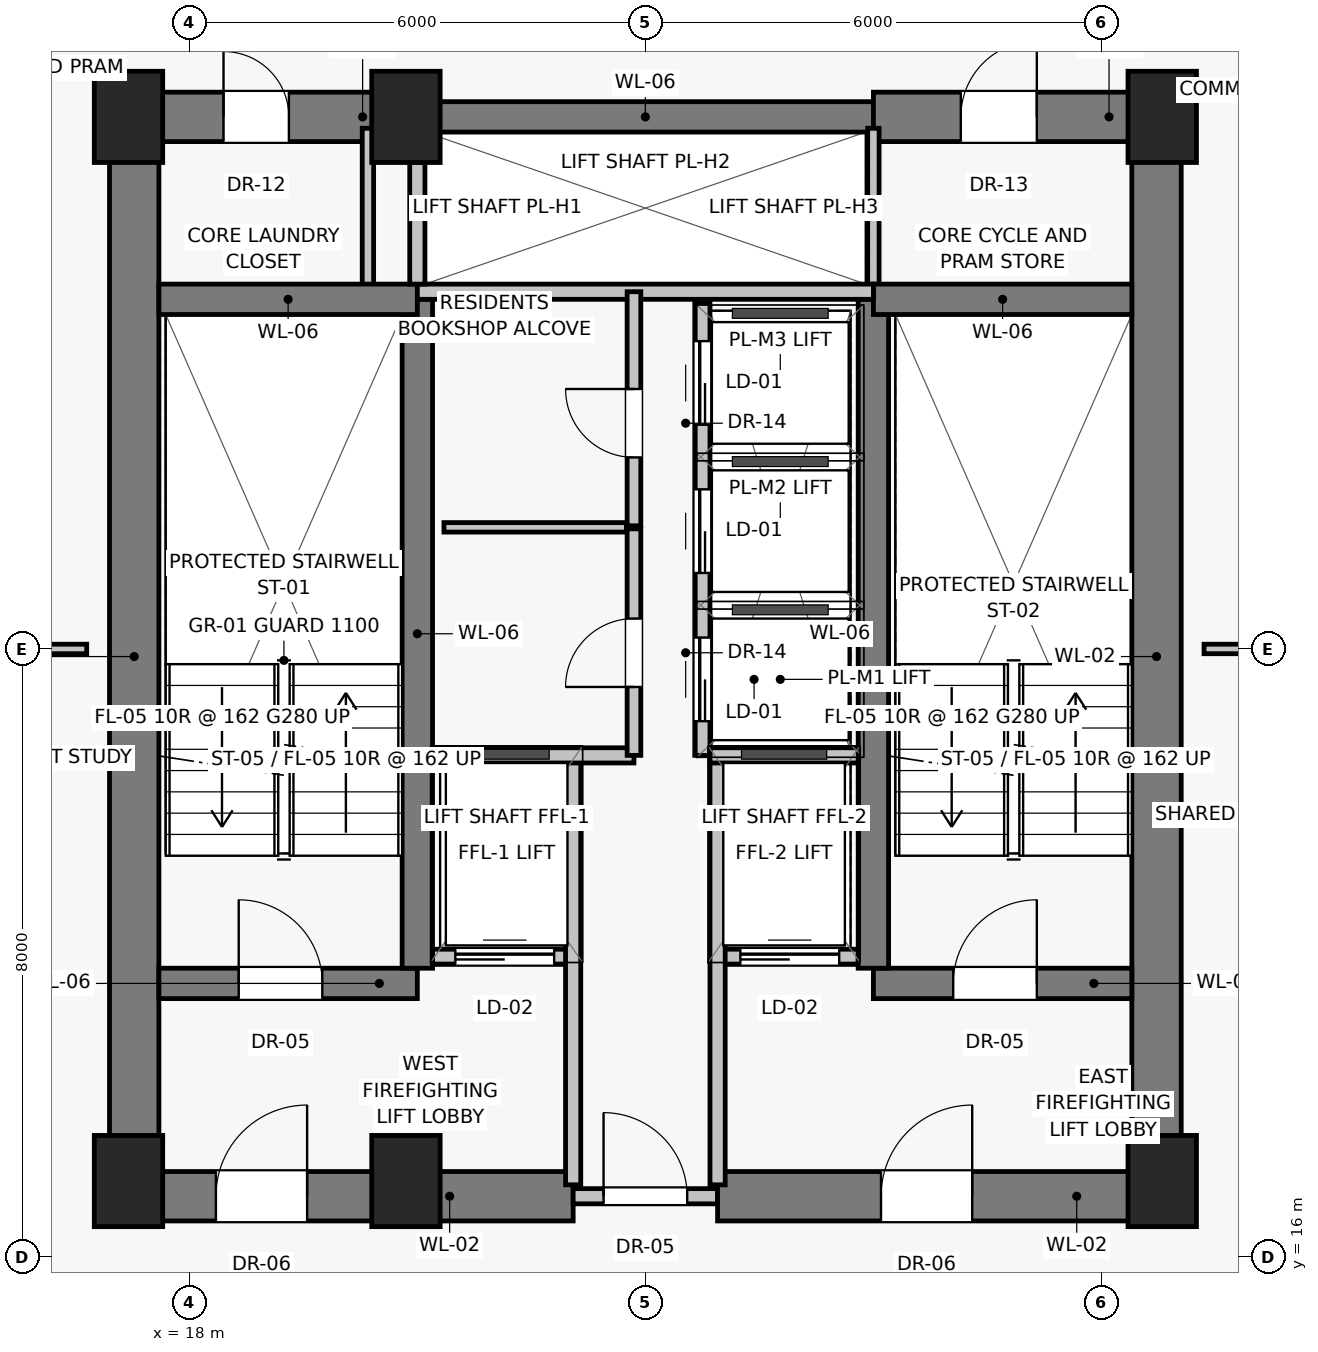
"""IFC4 building model, lengths in metres.
Left out: names, types, materials, properties, quantities, classifications, styles, units other than length and angle.
Written with IfcOpenShell. Run it as: python <this file> out.ifc"""

import sys

from ifc_helpers import new_model, si_unit, direction, frame, frame_2d, origin, origin_2d, place, context, subcontext, project, spatial, rectangle, extrude, source, transform, mapped, element, fill, save


model = new_model("IFC4")
c1 = context("Model", 3, precision=1e-05, world=origin(), true_north=direction((0.0, 1.0)))
c2 = subcontext(c1, "Body", "Model", "MODEL_VIEW")
j1 = project(units=[si_unit("LENGTHUNIT", "METRE"), si_unit("PLANEANGLEUNIT", "RADIAN")], contexts=[c1])
p1 = place(None, origin())
s1 = spatial("IfcSite", under=j1, at=p1, CompositionType="ELEMENT")
p2 = place(p1, origin())
s2 = spatial("IfcBuilding", under=s1, at=p2, CompositionType="ELEMENT")
p3 = place(p2, frame((0.0, 0.0, 129.5)))
s3 = spatial("IfcBuildingStorey", under=s2, at=p3, CompositionType="ELEMENT", Elevation=129.5)
for number, where, z_axis, x_axis in (
    (1, (17.2, 17.0, 0.0), (0.0, 0.0, 1.0), (1.0, 0.0, 0.0)),
    (2, (20.85, 17.0, 0.0), (0.0, 0.0, 1.0), (1.0, 0.0, 0.0)),
    (3, (30.8, 17.0, 0.0), (0.0, 0.0, 1.0), (1.0, 0.0, 0.0)),
    (4, (17.2, 31.0, 0.0), (0.0, 0.0, 1.0), (1.0, 0.0, 0.0)),
    (5, (20.85, 31.0, 0.0), (0.0, 0.0, 1.0), (1.0, 0.0, 0.0)),
    (6, (30.8, 31.0, 0.0), (0.0, 0.0, 1.0), (1.0, 0.0, 0.0)),
):
    element("IfcColumn", number, at=place(p3, frame(where, z_axis=z_axis, x_axis=x_axis)), inside=s3, PredefinedType="PILASTER", context=c2, shape_type="SweptSolid", body=[
        extrude(rectangle(XDim=0.9, YDim=1.2, at=origin_2d()), origin(), (0.0, 0.0, 1.0), 3.25),
    ])
for number, where, z_axis, x_axis in (
    (7, (17.275, 16.8, 0.0), (0.0, 0.0, 1.0), (0.0, 1.0, 0.0)),
    (8, (30.725, 16.8, 0.0), (0.0, 0.0, 1.0), (0.0, 1.0, 0.0)),
):
    element("IfcWall", number, at=place(p3, frame(where, z_axis=z_axis, x_axis=x_axis)), inside=s3, PredefinedType="SHEAR", context=c2, shape_type="SweptSolid", body=[
        extrude(rectangle(XDim=14.2, YDim=0.65, at=frame_2d((7.1, 0.0))), origin(), (0.0, 0.0, 1.0), 3.0),
    ])
p4 = place(p3, frame((17.2, 16.8, 0.0), z_axis=(0.0, 0.0, 1.0), x_axis=(1.0, 0.0, 0.0)))
e9 = element("IfcWall", 9, at=p4, inside=s3, PredefinedType="SHEAR", context=c2, shape_type="SweptSolid", body=[
    extrude(rectangle(XDim=5.85, YDim=0.65, at=frame_2d((2.925, 0.0))), origin(), (0.0, 0.0, 1.0), 3.0),
])
p5 = place(p4, frame((1.15, 0.0, 0.0)))
e10 = element("IfcOpeningElement", 10, at=p5, cuts=e9, PredefinedType="OPENING", context=c2, shape_type="SweptSolid", body=[
    extrude(rectangle(XDim=1.2, YDim=2.03, at=frame_2d((0.6, 1.015))), frame((0.0, 0.335, 0.0), z_axis=(0.0, -1.0, 0.0), x_axis=(1.0, 0.0, 0.0)), (0.0, 0.0, 1.0), 0.67),
])
p6 = place(p3, frame((23.05, 16.8, 0.0), z_axis=(0.0, 0.0, 1.0), x_axis=(1.0, 0.0, 0.0)))
e11 = element("IfcWall", 11, at=p6, inside=s3, PredefinedType="SOLIDWALL", context=c2, shape_type="SweptSolid", body=[
    extrude(rectangle(XDim=1.9, YDim=0.2, at=frame_2d((0.95, 0.0))), origin(), (0.0, 0.0, 1.0), 2.15),
])
p7 = place(p6, frame((0.4, 0.0, 0.0)))
e12 = element("IfcOpeningElement", 12, at=p7, cuts=e11, PredefinedType="OPENING", context=c2, shape_type="SweptSolid", body=[
    extrude(rectangle(XDim=1.1, YDim=2.03, at=frame_2d((0.55, 1.015))), frame((0.0, 0.11, 0.0), z_axis=(0.0, -1.0, 0.0), x_axis=(1.0, 0.0, 0.0)), (0.0, 0.0, 1.0), 0.22),
])
p8 = place(p3, frame((24.95, 16.8, 0.0), z_axis=(0.0, 0.0, 1.0), x_axis=(1.0, 0.0, 0.0)))
e13 = element("IfcWall", 13, at=p8, inside=s3, PredefinedType="SHEAR", context=c2, shape_type="SweptSolid", body=[
    extrude(rectangle(XDim=5.85, YDim=0.65, at=frame_2d((2.925, 0.0))), origin(), (0.0, 0.0, 1.0), 3.0),
])
p9 = place(p8, frame((2.15, 0.0, 0.0)))
e14 = element("IfcOpeningElement", 14, at=p9, cuts=e13, PredefinedType="OPENING", context=c2, shape_type="SweptSolid", body=[
    extrude(rectangle(XDim=1.2, YDim=2.03, at=frame_2d((0.6, 1.015))), frame((0.0, 0.335, 0.0), z_axis=(0.0, -1.0, 0.0), x_axis=(1.0, 0.0, 0.0)), (0.0, 0.0, 1.0), 0.67),
])
p10 = place(p3, frame((17.2, 31.0, 0.0), z_axis=(0.0, 0.0, 1.0), x_axis=(1.0, 0.0, 0.0)))
e15 = element("IfcWall", 15, at=p10, inside=s3, PredefinedType="SHEAR", context=c2, shape_type="SweptSolid", body=[
    extrude(rectangle(XDim=3.8, YDim=0.65, at=frame_2d((1.9, 0.0))), origin(), (0.0, 0.0, 1.0), 3.0),
])
p11 = place(p10, frame((1.25, 0.0, 0.0)))
e16 = element("IfcOpeningElement", 16, at=p11, cuts=e15, PredefinedType="OPENING", context=c2, shape_type="SweptSolid", body=[
    extrude(rectangle(XDim=0.86, YDim=2.01, at=frame_2d((0.43, 1.005))), frame((0.0, 0.335, 0.0), z_axis=(0.0, -1.0, 0.0), x_axis=(1.0, 0.0, 0.0)), (0.0, 0.0, 1.0), 0.67),
])
p12 = place(p3, frame((21.0, 31.0, 0.0), z_axis=(0.0, 0.0, 1.0), x_axis=(1.0, 0.0, 0.0)))
e17 = element("IfcWall", 17, at=p12, inside=s3, PredefinedType="SHEAR", context=c2, shape_type="SweptSolid", body=[
    extrude(rectangle(XDim=6.0, YDim=0.4, at=frame_2d((3.0, 0.0))), origin(), (0.0, 0.0, 1.0), 3.0),
])
p13 = place(p3, frame((27.0, 31.0, 0.0), z_axis=(0.0, 0.0, 1.0), x_axis=(1.0, 0.0, 0.0)))
e18 = element("IfcWall", 18, at=p13, inside=s3, PredefinedType="SHEAR", context=c2, shape_type="SweptSolid", body=[
    extrude(rectangle(XDim=3.8, YDim=0.65, at=frame_2d((1.9, 0.0))), origin(), (0.0, 0.0, 1.0), 3.0),
])
p14 = place(p13, frame((1.15, 0.0, 0.0)))
e19 = element("IfcOpeningElement", 19, at=p14, cuts=e18, PredefinedType="OPENING", context=c2, shape_type="SweptSolid", body=[
    extrude(rectangle(XDim=1.0, YDim=2.01, at=frame_2d((0.5, 1.005))), frame((0.0, 0.335, 0.0), z_axis=(0.0, -1.0, 0.0), x_axis=(1.0, 0.0, 0.0)), (0.0, 0.0, 1.0), 0.67),
])
for number, where, z_axis, x_axis in (
    (20, (20.35, 28.65, 0.0), (0.0, 0.0, 1.0), (0.0, 1.0, 0.0)),
    (21, (27.0, 28.65, 0.0), (0.0, 0.0, 1.0), (0.0, 1.0, 0.0)),
):
    element("IfcWall", number, at=place(p3, frame(where, z_axis=z_axis, x_axis=x_axis)), inside=s3, PredefinedType="PARTITIONING", context=c2, shape_type="SweptSolid", body=[
        extrude(rectangle(XDim=2.2, YDim=0.15, at=frame_2d((1.1, 0.0))), origin(), (0.0, 0.0, 1.0), 3.0),
    ])
p15 = place(p3, frame((17.6, 19.6, 0.0), z_axis=(0.0, 0.0, 1.0), x_axis=(1.0, 0.0, 0.0)))
e22 = element("IfcWall", 22, at=p15, inside=s3, PredefinedType="SHEAR", context=c2, shape_type="SweptSolid", body=[
    extrude(rectangle(XDim=3.4, YDim=0.4, at=frame_2d((1.7, 0.0))), origin(), (0.0, 0.0, 1.0), 3.0),
])
p16 = place(p15, frame((1.05, 0.0, 0.0)))
e23 = element("IfcOpeningElement", 23, at=p16, cuts=e22, PredefinedType="OPENING", context=c2, shape_type="SweptSolid", body=[
    extrude(rectangle(XDim=1.1, YDim=2.03, at=frame_2d((0.55, 1.015))), frame((0.0, 0.21, 0.0), z_axis=(0.0, -1.0, 0.0), x_axis=(1.0, 0.0, 0.0)), (0.0, 0.0, 1.0), 0.42),
])
p17 = place(p3, frame((21.2, 19.95, 0.0), z_axis=(0.0, 0.0, 1.0), x_axis=(1.0, 0.0, 0.0)))
e24 = element("IfcWall", 24, at=p17, inside=s3, PredefinedType="SOLIDWALL", context=c2, shape_type="SweptSolid", body=[
    extrude(rectangle(XDim=1.85, YDim=0.2, at=frame_2d((0.925, 0.0))), origin(), (0.0, 0.0, 1.0), 3.0),
])
p18 = place(p17, frame((0.3, 0.0, 0.0)))
e25 = element("IfcOpeningElement", 25, at=p18, cuts=e24, PredefinedType="OPENING", context=c2, shape_type="SweptSolid", body=[
    extrude(rectangle(XDim=1.3, YDim=2.25, at=frame_2d((0.65, 1.125))), frame((0.0, 0.11, 0.0), z_axis=(0.0, -1.0, 0.0), x_axis=(1.0, 0.0, 0.0)), (0.0, 0.0, 1.0), 0.22),
])
p19 = place(p3, frame((24.95, 19.95, 0.0), z_axis=(0.0, 0.0, 1.0), x_axis=(1.0, 0.0, 0.0)))
e26 = element("IfcWall", 26, at=p19, inside=s3, PredefinedType="SOLIDWALL", context=c2, shape_type="SweptSolid", body=[
    extrude(rectangle(XDim=1.85, YDim=0.2, at=frame_2d((0.925, 0.0))), origin(), (0.0, 0.0, 1.0), 3.0),
])
p20 = place(p19, frame((0.3, 0.0, 0.0)))
e27 = element("IfcOpeningElement", 27, at=p20, cuts=e26, PredefinedType="OPENING", context=c2, shape_type="SweptSolid", body=[
    extrude(rectangle(XDim=1.3, YDim=2.25, at=frame_2d((0.65, 1.125))), frame((0.0, 0.11, 0.0), z_axis=(0.0, -1.0, 0.0), x_axis=(1.0, 0.0, 0.0)), (0.0, 0.0, 1.0), 0.22),
])
p21 = place(p3, frame((27.0, 19.6, 0.0), z_axis=(0.0, 0.0, 1.0), x_axis=(1.0, 0.0, 0.0)))
e28 = element("IfcWall", 28, at=p21, inside=s3, PredefinedType="SHEAR", context=c2, shape_type="SweptSolid", body=[
    extrude(rectangle(XDim=3.4, YDim=0.4, at=frame_2d((1.7, 0.0))), origin(), (0.0, 0.0, 1.0), 3.0),
])
p22 = place(p21, frame((1.05, 0.0, 0.0)))
e29 = element("IfcOpeningElement", 29, at=p22, cuts=e28, PredefinedType="OPENING", context=c2, shape_type="SweptSolid", body=[
    extrude(rectangle(XDim=1.1, YDim=2.03, at=frame_2d((0.55, 1.015))), frame((0.0, 0.21, 0.0), z_axis=(0.0, -1.0, 0.0), x_axis=(1.0, 0.0, 0.0)), (0.0, 0.0, 1.0), 0.42),
])
for number, where, z_axis, x_axis in (
    (30, (21.0, 19.8, 0.0), (0.0, 0.0, 1.0), (0.0, 1.0, 0.0)),
    (31, (27.0, 19.8, 0.0), (0.0, 0.0, 1.0), (0.0, 1.0, 0.0)),
):
    element("IfcWall", number, at=place(p3, frame(where, z_axis=z_axis, x_axis=x_axis)), inside=s3, PredefinedType="SHEAR", context=c2, shape_type="SweptSolid", body=[
        extrude(rectangle(XDim=8.8, YDim=0.4, at=frame_2d((4.4, 0.0))), origin(), (0.0, 0.0, 1.0), 3.0),
    ])
for number, where, z_axis, x_axis in (
    (32, (17.6, 28.6, 0.0), (0.0, 0.0, 1.0), (1.0, 0.0, 0.0)),
    (33, (27.0, 28.6, 0.0), (0.0, 0.0, 1.0), (1.0, 0.0, 0.0)),
):
    element("IfcWall", number, at=place(p3, frame(where, z_axis=z_axis, x_axis=x_axis)), inside=s3, PredefinedType="SHEAR", context=c2, shape_type="SweptSolid", body=[
        extrude(rectangle(XDim=3.4, YDim=0.4, at=frame_2d((1.7, 0.0))), origin(), (0.0, 0.0, 1.0), 3.0),
    ])
for number, where, z_axis, x_axis in (
    (34, (23.05, 16.95, 0.0), (0.0, 0.0, 1.0), (0.0, 1.0, 0.0)),
    (35, (24.95, 16.95, 0.0), (0.0, 0.0, 1.0), (0.0, 1.0, 0.0)),
):
    element("IfcWall", number, at=place(p3, frame(where, z_axis=z_axis, x_axis=x_axis)), inside=s3, PredefinedType="SOLIDWALL", context=c2, shape_type="SweptSolid", body=[
        extrude(rectangle(XDim=5.6, YDim=0.2, at=frame_2d((2.8, 0.0))), origin(), (0.0, 0.0, 1.0), 3.0),
    ])
p23 = place(p3, frame((21.2, 22.6, 0.0), z_axis=(0.0, 0.0, 1.0), x_axis=(1.0, 0.0, 0.0)))
e36 = element("IfcWall", 36, at=p23, inside=s3, PredefinedType="SOLIDWALL", context=c2, shape_type="SweptSolid", body=[
    extrude(rectangle(XDim=2.65, YDim=0.2, at=frame_2d((1.325, 0.0))), origin(), (0.0, 0.0, 1.0), 3.0),
])
p24 = place(p3, frame((24.85, 22.6, 0.0), z_axis=(0.0, 0.0, 1.0), x_axis=(1.0, 0.0, 0.0)))
e37 = element("IfcWall", 37, at=p24, inside=s3, PredefinedType="SOLIDWALL", context=c2, shape_type="SweptSolid", body=[
    extrude(rectangle(XDim=1.95, YDim=0.2, at=frame_2d((0.975, 0.0))), origin(), (0.0, 0.0, 1.0), 3.0),
])
p25 = place(p3, frame((21.0, 28.7, 0.0), z_axis=(0.0, 0.0, 1.0), x_axis=(1.0, 0.0, 0.0)))
e38 = element("IfcWall", 38, at=p25, inside=s3, PredefinedType="SOLIDWALL", context=c2, shape_type="SweptSolid", body=[
    extrude(rectangle(XDim=6.0, YDim=0.2, at=frame_2d((3.0, 0.0))), origin(), (0.0, 0.0, 1.0), 3.0),
])
p26 = place(p3, frame((21.0, 28.8, 0.0), z_axis=(0.0, 0.0, 1.0), x_axis=(0.0, 1.0, 0.0)))
e39 = element("IfcWall", 39, at=p26, inside=s3, PredefinedType="SOLIDWALL", context=c2, shape_type="SweptSolid", body=[
    extrude(rectangle(XDim=1.6, YDim=0.2, at=frame_2d((0.8, 0.0))), origin(), (0.0, 0.0, 1.0), 3.0),
])
p27 = place(p3, frame((23.85, 22.6, 0.0), z_axis=(0.0, 0.0, 1.0), x_axis=(0.0, 1.0, 0.0)))
e40 = element("IfcWall", 40, at=p27, inside=s3, PredefinedType="PARTITIONING", context=c2, shape_type="SweptSolid", body=[
    extrude(rectangle(XDim=2.98, YDim=0.18, at=frame_2d((1.49, 0.0))), origin(), (0.0, 0.0, 1.0), 3.0),
])
p28 = place(p27, frame((0.9, 0.0, 0.0)))
e41 = element("IfcOpeningElement", 41, at=p28, cuts=e40, PredefinedType="OPENING", context=c2, shape_type="SweptSolid", body=[
    extrude(rectangle(XDim=0.9, YDim=2.01, at=frame_2d((0.45, 1.005))), frame((0.0, 0.1, 0.0), z_axis=(0.0, -1.0, 0.0), x_axis=(1.0, 0.0, 0.0)), (0.0, 0.0, 1.0), 0.2),
])
p29 = place(p3, frame((23.85, 25.62, 0.0), z_axis=(0.0, 0.0, 1.0), x_axis=(0.0, 1.0, 0.0)))
e42 = element("IfcWall", 42, at=p29, inside=s3, PredefinedType="PARTITIONING", context=c2, shape_type="SweptSolid", body=[
    extrude(rectangle(XDim=3.08, YDim=0.18, at=frame_2d((1.54, 0.0))), origin(), (0.0, 0.0, 1.0), 3.0),
])
p30 = place(p29, frame((0.9, 0.0, 0.0)))
e43 = element("IfcOpeningElement", 43, at=p30, cuts=e42, PredefinedType="OPENING", context=c2, shape_type="SweptSolid", body=[
    extrude(rectangle(XDim=0.9, YDim=2.01, at=frame_2d((0.45, 1.005))), frame((0.0, 0.1, 0.0), z_axis=(0.0, -1.0, 0.0), x_axis=(1.0, 0.0, 0.0)), (0.0, 0.0, 1.0), 0.2),
])
p31 = place(p3, frame((24.75, 22.6, 0.0), z_axis=(0.0, 0.0, 1.0), x_axis=(0.0, 1.0, 0.0)))
e44 = element("IfcWall", 44, at=p31, inside=s3, PredefinedType="SOLIDWALL", context=c2, shape_type="SweptSolid", body=[
    extrude(rectangle(XDim=5.95, YDim=0.2, at=frame_2d((2.975, 0.0))), origin(), (0.0, 0.0, 1.0), 3.0),
])
p32 = place(p31, frame((0.45, 0.0, 0.0)))
e45 = element("IfcOpeningElement", 45, at=p32, cuts=e44, PredefinedType="OPENING", context=c2, shape_type="SweptSolid", body=[
    extrude(rectangle(XDim=1.1, YDim=2.08, at=frame_2d((0.55, 1.04))), frame((0.0, 0.11, 0.0), z_axis=(0.0, -1.0, 0.0), x_axis=(1.0, 0.0, 0.0)), (0.0, 0.0, 1.0), 0.22),
])
p33 = place(p31, frame((2.4, 0.0, 0.0)))
e46 = element("IfcOpeningElement", 46, at=p33, cuts=e44, PredefinedType="OPENING", context=c2, shape_type="SweptSolid", body=[
    extrude(rectangle(XDim=1.1, YDim=2.08, at=frame_2d((0.55, 1.04))), frame((0.0, 0.11, 0.0), z_axis=(0.0, -1.0, 0.0), x_axis=(1.0, 0.0, 0.0)), (0.0, 0.0, 1.0), 0.22),
])
p34 = place(p31, frame((4.35, 0.0, 0.0)))
e47 = element("IfcOpeningElement", 47, at=p34, cuts=e44, PredefinedType="OPENING", context=c2, shape_type="SweptSolid", body=[
    extrude(rectangle(XDim=1.1, YDim=2.08, at=frame_2d((0.55, 1.04))), frame((0.0, 0.11, 0.0), z_axis=(0.0, -1.0, 0.0), x_axis=(1.0, 0.0, 0.0)), (0.0, 0.0, 1.0), 0.22),
])
p35 = place(p3, frame((21.35, 25.6, 0.0), z_axis=(0.0, 0.0, 1.0), x_axis=(1.0, 0.0, 0.0)))
e48 = element("IfcWall", 48, at=p35, inside=s3, PredefinedType="PARTITIONING", context=c2, shape_type="SweptSolid", body=[
    extrude(rectangle(XDim=2.4, YDim=0.125, at=frame_2d((1.2, 0.0))), origin(), (0.0, 0.0, 1.0), 3.0),
])
for number, where, z_axis, x_axis in (
    (49, (14.55, 24.0, 0.0), (0.0, 0.0, 1.0), (1.0, 0.0, 0.0)),
    (50, (31.35, 24.0, 0.0), (0.0, 0.0, 1.0), (1.0, 0.0, 0.0)),
):
    element("IfcWall", number, at=place(p3, frame(where, z_axis=z_axis, x_axis=x_axis)), inside=s3, PredefinedType="PARTITIONING", context=c2, shape_type="SweptSolid", body=[
        extrude(rectangle(XDim=2.1, YDim=0.125, at=frame_2d((1.05, 0.0))), origin(), (0.0, 0.0, 1.0), 3.0),
    ])
m1 = source(origin(), c2, "Body", "SweptSolid", [
    extrude(rectangle(XDim=1.2, YDim=2.03, at=frame_2d((0.6, 1.015))), frame((0.0, 0.025, 0.0), z_axis=(0.0, -1.0, 0.0), x_axis=(1.0, 0.0, 0.0)), (0.0, 0.0, 1.0), 0.05),
])
p36 = place(p5, origin())
e51 = element("IfcDoor", 51, at=p36, inside=s3, OperationType="SINGLE_SWING_RIGHT", PredefinedType="DOOR", context=c2, shape_type="MappedRepresentation", body=[
    mapped(m1, transform((0.0, 0.0, 0.0), scale=1.0)),
])
fill(e10, e51)
m2 = source(origin(), c2, "Body", "SweptSolid", [
    extrude(rectangle(XDim=1.1, YDim=2.03, at=frame_2d((0.55, 1.015))), frame((0.0, 0.025, 0.0), z_axis=(0.0, -1.0, 0.0), x_axis=(1.0, 0.0, 0.0)), (0.0, 0.0, 1.0), 0.05),
])
p37 = place(p7, origin())
e52 = element("IfcDoor", 52, at=p37, inside=s3, OperationType="SINGLE_SWING_LEFT", PredefinedType="DOOR", context=c2, shape_type="MappedRepresentation", body=[
    mapped(m2, transform((0.0, 0.0, 0.0), scale=1.0)),
])
fill(e12, e52)
p38 = place(p9, origin())
e53 = element("IfcDoor", 53, at=p38, inside=s3, OperationType="SINGLE_SWING_RIGHT", PredefinedType="DOOR", context=c2, shape_type="MappedRepresentation", body=[
    mapped(m1, transform((0.0, 0.0, 0.0), scale=1.0)),
])
fill(e14, e53)
m3 = source(origin(), c2, "Body", "SweptSolid", [
    extrude(rectangle(XDim=0.86, YDim=2.01, at=frame_2d((0.43, 1.005))), frame((0.0, 0.025, 0.0), z_axis=(0.0, -1.0, 0.0), x_axis=(1.0, 0.0, 0.0)), (0.0, 0.0, 1.0), 0.05),
])
p39 = place(p11, origin())
e54 = element("IfcDoor", 54, at=p39, inside=s3, OperationType="SINGLE_SWING_LEFT", PredefinedType="DOOR", context=c2, shape_type="MappedRepresentation", body=[
    mapped(m3, transform((0.0, 0.0, 0.0), scale=1.0)),
])
fill(e16, e54)
m4 = source(origin(), c2, "Body", "SweptSolid", [
    extrude(rectangle(XDim=1.0, YDim=2.01, at=frame_2d((0.5, 1.005))), frame((0.0, 0.025, 0.0), z_axis=(0.0, -1.0, 0.0), x_axis=(1.0, 0.0, 0.0)), (0.0, 0.0, 1.0), 0.05),
])
p40 = place(p14, origin())
e55 = element("IfcDoor", 55, at=p40, inside=s3, OperationType="SINGLE_SWING_RIGHT", PredefinedType="DOOR", context=c2, shape_type="MappedRepresentation", body=[
    mapped(m4, transform((0.0, 0.0, 0.0), scale=1.0)),
])
fill(e19, e55)
p41 = place(p16, origin())
e56 = element("IfcDoor", 56, at=p41, inside=s3, OperationType="SINGLE_SWING_LEFT", PredefinedType="DOOR", context=c2, shape_type="MappedRepresentation", body=[
    mapped(m2, transform((0.0, 0.0, 0.0), scale=1.0)),
])
fill(e23, e56)
m5 = source(origin(), c2, "Body", "SweptSolid", [
    extrude(rectangle(XDim=1.3, YDim=2.25, at=frame_2d((0.65, 1.125))), frame((0.0, 0.025, 0.0), z_axis=(0.0, -1.0, 0.0), x_axis=(1.0, 0.0, 0.0)), (0.0, 0.0, 1.0), 0.05),
])
p42 = place(p18, origin())
e57 = element("IfcDoor", 57, at=p42, inside=s3, OperationType="SLIDING_TO_LEFT", PredefinedType="DOOR", context=c2, shape_type="MappedRepresentation", body=[
    mapped(m5, transform((0.0, 0.0, 0.0), scale=1.0)),
])
fill(e25, e57)
p43 = place(p20, origin())
e58 = element("IfcDoor", 58, at=p43, inside=s3, OperationType="SLIDING_TO_LEFT", PredefinedType="DOOR", context=c2, shape_type="MappedRepresentation", body=[
    mapped(m5, transform((0.0, 0.0, 0.0), scale=1.0)),
])
fill(e27, e58)
p44 = place(p22, origin())
e59 = element("IfcDoor", 59, at=p44, inside=s3, OperationType="SINGLE_SWING_RIGHT", PredefinedType="DOOR", context=c2, shape_type="MappedRepresentation", body=[
    mapped(m2, transform((0.0, 0.0, 0.0), scale=1.0)),
])
fill(e29, e59)
m6 = source(origin(), c2, "Body", "SweptSolid", [
    extrude(rectangle(XDim=0.9, YDim=2.01, at=frame_2d((0.45, 1.005))), frame((0.0, 0.025, 0.0), z_axis=(0.0, -1.0, 0.0), x_axis=(1.0, 0.0, 0.0)), (0.0, 0.0, 1.0), 0.05),
])
p45 = place(p28, origin())
e60 = element("IfcDoor", 60, at=p45, inside=s3, OperationType="SINGLE_SWING_LEFT", PredefinedType="DOOR", context=c2, shape_type="MappedRepresentation", body=[
    mapped(m6, transform((0.0, 0.0, 0.0), scale=1.0)),
])
fill(e41, e60)
p46 = place(p30, origin())
e61 = element("IfcDoor", 61, at=p46, inside=s3, OperationType="SINGLE_SWING_RIGHT", PredefinedType="DOOR", context=c2, shape_type="MappedRepresentation", body=[
    mapped(m6, transform((0.0, 0.0, 0.0), scale=1.0)),
])
fill(e43, e61)
m7 = source(origin(), c2, "Body", "SweptSolid", [
    extrude(rectangle(XDim=1.1, YDim=2.08, at=frame_2d((0.55, 1.04))), frame((0.0, 0.025, 0.0), z_axis=(0.0, -1.0, 0.0), x_axis=(1.0, 0.0, 0.0)), (0.0, 0.0, 1.0), 0.05),
])
p47 = place(p32, origin())
e62 = element("IfcDoor", 62, at=p47, inside=s3, OperationType="SLIDING_TO_LEFT", PredefinedType="DOOR", context=c2, shape_type="MappedRepresentation", body=[
    mapped(m7, transform((0.0, 0.0, 0.0), scale=1.0)),
])
fill(e45, e62)
p48 = place(p33, origin())
e63 = element("IfcDoor", 63, at=p48, inside=s3, OperationType="SLIDING_TO_LEFT", PredefinedType="DOOR", context=c2, shape_type="MappedRepresentation", body=[
    mapped(m7, transform((0.0, 0.0, 0.0), scale=1.0)),
])
fill(e46, e63)
p49 = place(p34, origin())
e64 = element("IfcDoor", 64, at=p49, inside=s3, OperationType="SLIDING_TO_LEFT", PredefinedType="DOOR", context=c2, shape_type="MappedRepresentation", body=[
    mapped(m7, transform((0.0, 0.0, 0.0), scale=1.0)),
])
fill(e47, e64)
save(model, sys.argv[1])
